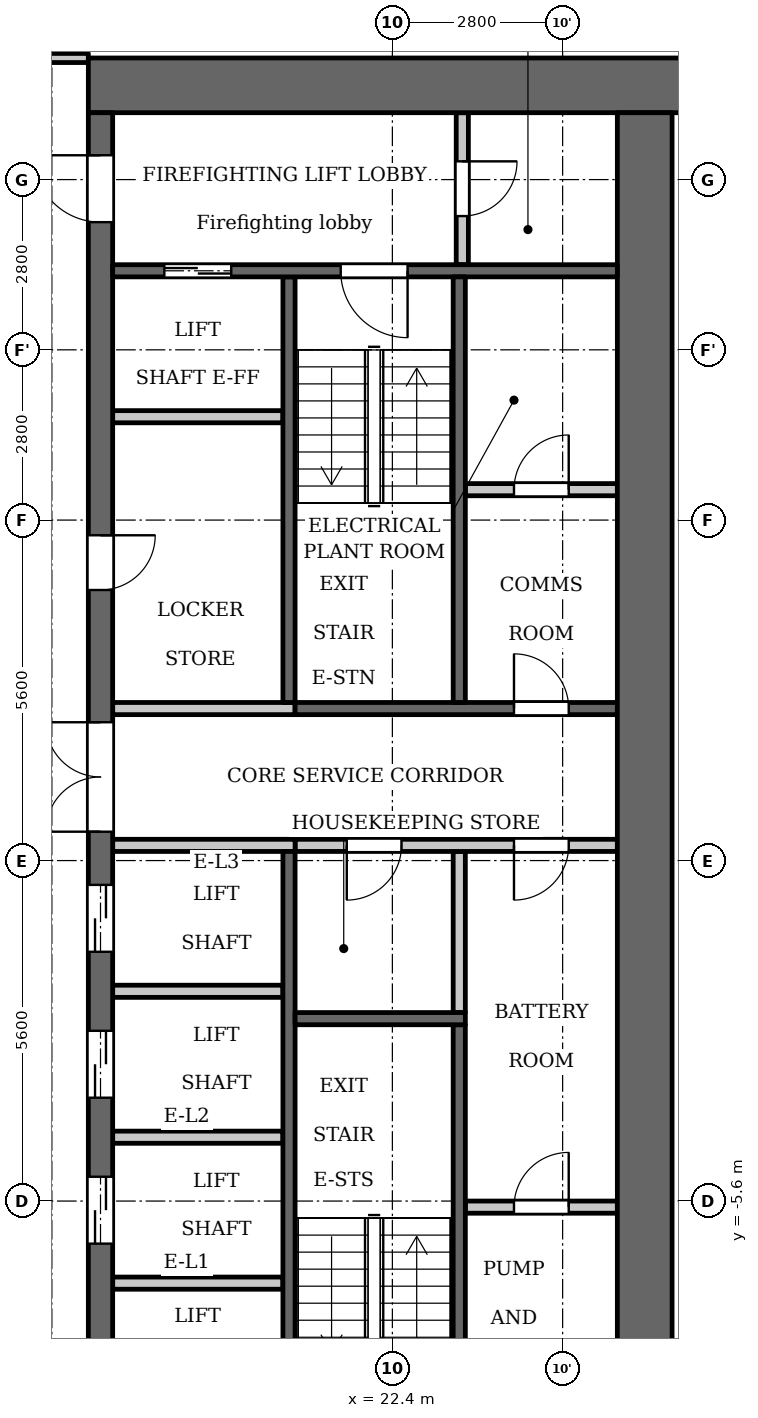
"""IFC4 building model, lengths in metres.
Left out: names, types, materials, properties, quantities, classifications, styles, units other than length and angle.
Written with IfcOpenShell. Run it as: python <this file> out.ifc"""

import sys

from ifc_helpers import new_model, si_unit, direction, frame, frame_2d, origin, place, context, subcontext, project, spatial, rectangle, extrude, element, fill, save


model = new_model("IFC4")
c1 = context("Model", 3, precision=1e-05, world=origin(), true_north=direction((0.0, 1.0)))
c2 = subcontext(c1, "Body", "Model", "MODEL_VIEW")
j1 = project(units=[si_unit("LENGTHUNIT", "METRE"), si_unit("PLANEANGLEUNIT", "RADIAN")], contexts=[c1])
p1 = place(None, origin())
s1 = spatial("IfcSite", under=j1, at=p1, CompositionType="ELEMENT")
p2 = place(p1, origin())
s2 = spatial("IfcBuilding", under=s1, at=p2, CompositionType="ELEMENT")
p3 = place(p2, frame((0.0, 0.0, 58.5)))
s3 = spatial("IfcBuildingStorey", under=s2, at=p3, CompositionType="ELEMENT", Elevation=58.5)
p4 = place(p3, frame((23.5, -2.5, 0.0), z_axis=(0.0, 0.0, 1.0), x_axis=(0.0, 1.0, 0.0)))
e1 = element("IfcWall", 1, at=p4, inside=s3, PredefinedType="PARTITIONING", context=c2, shape_type="SweptSolid", body=[
    extrude(rectangle(XDim=2.65, YDim=0.2, at=frame_2d((1.325, 0.0))), origin(), (0.0, 0.0, 1.0), 3.2),
])
p5 = place(p3, frame((20.7, 2.6, 0.0), z_axis=(0.0, 0.0, 1.0), x_axis=(0.0, 1.0, 0.0)))
e2 = element("IfcWall", 2, at=p5, inside=s3, PredefinedType="SHEAR", context=c2, shape_type="SweptSolid", body=[
    extrude(rectangle(XDim=7.0, YDim=0.2, at=frame_2d((3.5, 0.0))), origin(), (0.0, 0.0, 1.0), 3.2),
])
p6 = place(p3, frame((20.7, -9.6, 0.0), z_axis=(0.0, 0.0, 1.0), x_axis=(0.0, 1.0, 0.0)))
e3 = element("IfcWall", 3, at=p6, inside=s3, PredefinedType="SHEAR", context=c2, shape_type="SweptSolid", body=[
    extrude(rectangle(XDim=9.75, YDim=0.2, at=frame_2d((4.875, 0.0))), origin(), (0.0, 0.0, 1.0), 3.2),
])
p7 = place(p3, frame((20.8, 2.5, 0.0), z_axis=(0.0, 0.0, 1.0), x_axis=(1.0, 0.0, 0.0)))
e4 = element("IfcWall", 4, at=p7, inside=s3, PredefinedType="SHEAR", context=c2, shape_type="SweptSolid", body=[
    extrude(rectangle(XDim=5.3, YDim=0.2, at=frame_2d((2.65, 0.0))), origin(), (0.0, 0.0, 1.0), 3.2),
])
p8 = place(p7, frame((3.6, 0.0, 0.0)))
e5 = element("IfcOpeningElement", 5, at=p8, cuts=e4, PredefinedType="OPENING", context=c2, shape_type="SweptSolid", body=[
    extrude(rectangle(XDim=0.9, YDim=2.1, at=frame_2d((0.45, 1.05))), frame((0.0, 0.11, 0.0), z_axis=(0.0, -1.0, 0.0), x_axis=(1.0, 0.0, 0.0)), (0.0, 0.0, 1.0), 0.22),
])
p9 = place(p3, frame((20.8, 0.25, 0.0), z_axis=(0.0, 0.0, 1.0), x_axis=(1.0, 0.0, 0.0)))
e6 = element("IfcWall", 6, at=p9, inside=s3, PredefinedType="PARTITIONING", context=c2, shape_type="SweptSolid", body=[
    extrude(rectangle(XDim=5.3, YDim=0.2, at=frame_2d((2.65, 0.0))), origin(), (0.0, 0.0, 1.0), 3.2),
])
p10 = place(p9, frame((0.85, 0.0, 0.0)))
e7 = element("IfcOpeningElement", 7, at=p10, cuts=e6, PredefinedType="OPENING", context=c2, shape_type="SweptSolid", body=[
    extrude(rectangle(XDim=0.9, YDim=2.1, at=frame_2d((0.45, 1.05))), frame((0.0, 0.11, 0.0), z_axis=(0.0, -1.0, 0.0), x_axis=(1.0, 0.0, 0.0)), (0.0, 0.0, 1.0), 0.22),
])
p11 = place(p9, frame((3.6, 0.0, 0.0)))
e8 = element("IfcOpeningElement", 8, at=p11, cuts=e6, PredefinedType="OPENING", context=c2, shape_type="SweptSolid", body=[
    extrude(rectangle(XDim=0.9, YDim=2.1, at=frame_2d((0.45, 1.05))), frame((0.0, 0.11, 0.0), z_axis=(0.0, -1.0, 0.0), x_axis=(1.0, 0.0, 0.0)), (0.0, 0.0, 1.0), 0.22),
])
p12 = place(p3, frame((17.4, 12.75, 0.0), z_axis=(0.0, 0.0, 1.0), x_axis=(1.0, 0.0, 0.0)))
e9 = element("IfcWall", 9, at=p12, inside=s3, PredefinedType="SHEAR", context=c2, shape_type="SweptSolid", body=[
    extrude(rectangle(XDim=10.4, YDim=0.9, at=frame_2d((5.2, 0.0))), origin(), (0.0, 0.0, 1.0), 3.2),
])
p13 = place(p3, frame((17.6, -12.3, 0.0), z_axis=(0.0, 0.0, 1.0), x_axis=(0.0, 1.0, 0.0)))
e10 = element("IfcWall", 10, at=p13, inside=s3, PredefinedType="SHEAR", context=c2, shape_type="SweptSolid", body=[
    extrude(rectangle(XDim=24.6, YDim=0.4, at=frame_2d((12.3, 0.0))), origin(), (0.0, 0.0, 1.0), 3.2),
])
p14 = place(p13, frame((6.0, 0.0, 0.0)))
e11 = element("IfcOpeningElement", 11, at=p14, cuts=e10, PredefinedType="OPENING", context=c2, shape_type="SweptSolid", body=[
    extrude(rectangle(XDim=1.1, YDim=2.1, at=frame_2d((0.55, 1.05))), frame((0.0, 0.21, 0.0), z_axis=(0.0, -1.0, 0.0), x_axis=(1.0, 0.0, 0.0)), (0.0, 0.0, 1.0), 0.42),
])
p15 = place(p13, frame((8.4, 0.0, 0.0)))
e12 = element("IfcOpeningElement", 12, at=p15, cuts=e10, PredefinedType="OPENING", context=c2, shape_type="SweptSolid", body=[
    extrude(rectangle(XDim=1.1, YDim=2.1, at=frame_2d((0.55, 1.05))), frame((0.0, 0.21, 0.0), z_axis=(0.0, -1.0, 0.0), x_axis=(1.0, 0.0, 0.0)), (0.0, 0.0, 1.0), 0.42),
])
p16 = place(p13, frame((10.8, 0.0, 0.0)))
e13 = element("IfcOpeningElement", 13, at=p16, cuts=e10, PredefinedType="OPENING", context=c2, shape_type="SweptSolid", body=[
    extrude(rectangle(XDim=1.1, YDim=2.1, at=frame_2d((0.55, 1.05))), frame((0.0, 0.21, 0.0), z_axis=(0.0, -1.0, 0.0), x_axis=(1.0, 0.0, 0.0)), (0.0, 0.0, 1.0), 0.42),
])
p17 = place(p13, frame((16.75, 0.0, 0.0)))
e14 = element("IfcOpeningElement", 14, at=p17, cuts=e10, PredefinedType="OPENING", context=c2, shape_type="SweptSolid", body=[
    extrude(rectangle(XDim=0.9, YDim=2.1, at=frame_2d((0.45, 1.05))), frame((0.0, 0.21, 0.0), z_axis=(0.0, -1.0, 0.0), x_axis=(1.0, 0.0, 0.0)), (0.0, 0.0, 1.0), 0.42),
])
p18 = place(p13, frame((22.8, 0.0, 0.0)))
e15 = element("IfcOpeningElement", 15, at=p18, cuts=e10, PredefinedType="OPENING", context=c2, shape_type="SweptSolid", body=[
    extrude(rectangle(XDim=1.1, YDim=2.1, at=frame_2d((0.55, 1.05))), frame((0.0, 0.21, 0.0), z_axis=(0.0, -1.0, 0.0), x_axis=(1.0, 0.0, 0.0)), (0.0, 0.0, 1.0), 0.42),
])
p19 = place(p13, frame((0.7, 0.0, 0.0)))
e16 = element("IfcOpeningElement", 16, at=p19, cuts=e10, PredefinedType="OPENING", context=c2, shape_type="SweptSolid", body=[
    extrude(rectangle(XDim=1.1, YDim=2.1, at=frame_2d((0.55, 1.05))), frame((0.0, 0.21, 0.0), z_axis=(0.0, -1.0, 0.0), x_axis=(1.0, 0.0, 0.0)), (0.0, 0.0, 1.0), 0.42),
])
p20 = place(p13, frame((12.775, 0.0, 0.0)))
e17 = element("IfcOpeningElement", 17, at=p20, cuts=e10, PredefinedType="OPENING", context=c2, shape_type="SweptSolid", body=[
    extrude(rectangle(XDim=1.8, YDim=2.1, at=frame_2d((0.9, 1.05))), frame((0.0, 0.21, 0.0), z_axis=(0.0, -1.0, 0.0), x_axis=(1.0, 0.0, 0.0)), (0.0, 0.0, 1.0), 0.42),
])
p21 = place(p3, frame((26.55, -12.3, 0.0), z_axis=(0.0, 0.0, 1.0), x_axis=(0.0, 1.0, 0.0)))
e18 = element("IfcWall", 18, at=p21, inside=s3, PredefinedType="SHEAR", context=c2, shape_type="SweptSolid", body=[
    extrude(rectangle(XDim=24.6, YDim=0.9, at=frame_2d((12.3, 0.0))), origin(), (0.0, 0.0, 1.0), 3.2),
])
p22 = place(p3, frame((23.55, 9.8, 0.0), z_axis=(0.0, 0.0, 1.0), x_axis=(0.0, 1.0, 0.0)))
e19 = element("IfcWall", 19, at=p22, inside=s3, PredefinedType="PARTITIONING", context=c2, shape_type="SweptSolid", body=[
    extrude(rectangle(XDim=2.5, YDim=0.2, at=frame_2d((1.25, 0.0))), origin(), (0.0, 0.0, 1.0), 3.2),
])
p23 = place(p22, frame((0.8, 0.0, 0.0)))
e20 = element("IfcOpeningElement", 20, at=p23, cuts=e19, PredefinedType="OPENING", context=c2, shape_type="SweptSolid", body=[
    extrude(rectangle(XDim=0.9, YDim=2.1, at=frame_2d((0.45, 1.05))), frame((0.0, 0.11, 0.0), z_axis=(0.0, -1.0, 0.0), x_axis=(1.0, 0.0, 0.0)), (0.0, 0.0, 1.0), 0.22),
])
p24 = place(p3, frame((23.6, -5.7, 0.0), z_axis=(0.0, 0.0, 1.0), x_axis=(1.0, 0.0, 0.0)))
e21 = element("IfcWall", 21, at=p24, inside=s3, PredefinedType="PARTITIONING", context=c2, shape_type="SweptSolid", body=[
    extrude(rectangle(XDim=2.5, YDim=0.2, at=frame_2d((1.25, 0.0))), origin(), (0.0, 0.0, 1.0), 3.2),
])
p25 = place(p24, frame((0.8, 0.0, 0.0)))
e22 = element("IfcOpeningElement", 22, at=p25, cuts=e21, PredefinedType="OPENING", context=c2, shape_type="SweptSolid", body=[
    extrude(rectangle(XDim=0.9, YDim=2.1, at=frame_2d((0.45, 1.05))), frame((0.0, 0.11, 0.0), z_axis=(0.0, -1.0, 0.0), x_axis=(1.0, 0.0, 0.0)), (0.0, 0.0, 1.0), 0.22),
])
p26 = place(p3, frame((23.6, 6.1, 0.0), z_axis=(0.0, 0.0, 1.0), x_axis=(1.0, 0.0, 0.0)))
e23 = element("IfcWall", 23, at=p26, inside=s3, PredefinedType="PARTITIONING", context=c2, shape_type="SweptSolid", body=[
    extrude(rectangle(XDim=2.5, YDim=0.2, at=frame_2d((1.25, 0.0))), origin(), (0.0, 0.0, 1.0), 3.2),
])
p27 = place(p26, frame((0.8, 0.0, 0.0)))
e24 = element("IfcOpeningElement", 24, at=p27, cuts=e23, PredefinedType="OPENING", context=c2, shape_type="SweptSolid", body=[
    extrude(rectangle(XDim=0.9, YDim=2.1, at=frame_2d((0.45, 1.05))), frame((0.0, 0.11, 0.0), z_axis=(0.0, -1.0, 0.0), x_axis=(1.0, 0.0, 0.0)), (0.0, 0.0, 1.0), 0.22),
])
for number, where, z_axis, x_axis in (
    (25, (17.8, -6.95, 0.0), (0.0, 0.0, 1.0), (1.0, 0.0, 0.0)),
    (26, (17.8, -4.55, 0.0), (0.0, 0.0, 1.0), (1.0, 0.0, 0.0)),
    (27, (17.8, -2.15, 0.0), (0.0, 0.0, 1.0), (1.0, 0.0, 0.0)),
):
    element("IfcWall", number, at=place(p3, frame(where, z_axis=z_axis, x_axis=x_axis)), inside=s3, PredefinedType="PARTITIONING", context=c2, shape_type="SweptSolid", body=[
        extrude(rectangle(XDim=2.8, YDim=0.2, at=frame_2d((1.4, 0.0))), origin(), (0.0, 0.0, 1.0), 3.2),
    ])
for number, where, z_axis, x_axis in (
    (28, (17.8, 0.25, 0.0), (0.0, 0.0, 1.0), (1.0, 0.0, 0.0)),
    (29, (17.8, 2.5, 0.0), (0.0, 0.0, 1.0), (1.0, 0.0, 0.0)),
):
    element("IfcWall", number, at=place(p3, frame(where, z_axis=z_axis, x_axis=x_axis)), inside=s3, PredefinedType="PARTITIONING", context=c2, shape_type="SweptSolid", body=[
        extrude(rectangle(XDim=3.0, YDim=0.2, at=frame_2d((1.5, 0.0))), origin(), (0.0, 0.0, 1.0), 3.2),
    ])
p28 = place(p3, frame((17.8, 7.3, 0.0), z_axis=(0.0, 0.0, 1.0), x_axis=(1.0, 0.0, 0.0)))
e30 = element("IfcWall", 30, at=p28, inside=s3, PredefinedType="PARTITIONING", context=c2, shape_type="SweptSolid", body=[
    extrude(rectangle(XDim=2.8, YDim=0.2, at=frame_2d((1.4, 0.0))), origin(), (0.0, 0.0, 1.0), 3.2),
])
p29 = place(p3, frame((17.8, 9.7, 0.0), z_axis=(0.0, 0.0, 1.0), x_axis=(1.0, 0.0, 0.0)))
e31 = element("IfcWall", 31, at=p29, inside=s3, PredefinedType="SHEAR", context=c2, shape_type="SweptSolid", body=[
    extrude(rectangle(XDim=8.3, YDim=0.2, at=frame_2d((4.15, 0.0))), origin(), (0.0, 0.0, 1.0), 3.2),
])
p30 = place(p29, frame((0.85, 0.0, 0.0)))
e32 = element("IfcOpeningElement", 32, at=p30, cuts=e31, PredefinedType="OPENING", context=c2, shape_type="SweptSolid", body=[
    extrude(rectangle(XDim=1.1, YDim=2.1, at=frame_2d((0.55, 1.05))), frame((0.0, 0.11, 0.0), z_axis=(0.0, -1.0, 0.0), x_axis=(1.0, 0.0, 0.0)), (0.0, 0.0, 1.0), 0.22),
])
p31 = place(p29, frame((3.75, 0.0, 0.0)))
e33 = element("IfcOpeningElement", 33, at=p31, cuts=e31, PredefinedType="OPENING", context=c2, shape_type="SweptSolid", body=[
    extrude(rectangle(XDim=1.1, YDim=2.1, at=frame_2d((0.55, 1.05))), frame((0.0, 0.11, 0.0), z_axis=(0.0, -1.0, 0.0), x_axis=(1.0, 0.0, 0.0)), (0.0, 0.0, 1.0), 0.22),
])
p32 = place(p3, frame((23.5, 2.6, 0.0), z_axis=(0.0, 0.0, 1.0), x_axis=(0.0, 1.0, 0.0)))
e34 = element("IfcWall", 34, at=p32, inside=s3, PredefinedType="SHEAR", context=c2, shape_type="SweptSolid", body=[
    extrude(rectangle(XDim=7.0, YDim=0.2, at=frame_2d((3.5, 0.0))), origin(), (0.0, 0.0, 1.0), 3.2),
])
p33 = place(p3, frame((23.5, -9.6, 0.0), z_axis=(0.0, 0.0, 1.0), x_axis=(0.0, 1.0, 0.0)))
e35 = element("IfcWall", 35, at=p33, inside=s3, PredefinedType="SHEAR", context=c2, shape_type="SweptSolid", body=[
    extrude(rectangle(XDim=6.9, YDim=0.2, at=frame_2d((3.45, 0.0))), origin(), (0.0, 0.0, 1.0), 3.2),
])
p34 = place(p3, frame((20.8, -2.6, 0.0), z_axis=(0.0, 0.0, 1.0), x_axis=(1.0, 0.0, 0.0)))
e36 = element("IfcWall", 36, at=p34, inside=s3, PredefinedType="SHEAR", context=c2, shape_type="SweptSolid", body=[
    extrude(rectangle(XDim=2.8, YDim=0.2, at=frame_2d((1.4, 0.0))), origin(), (0.0, 0.0, 1.0), 3.2),
])
p35 = place(p3, frame((-17.4, 13.2, 0.0), z_axis=(0.0, 0.0, 1.0), x_axis=(1.0, 0.0, 0.0)))
e37 = element("IfcWall", 37, at=p35, inside=s3, PredefinedType="PARTITIONING", context=c2, shape_type="SweptSolid", body=[
    extrude(rectangle(XDim=34.8, YDim=0.15, at=frame_2d((17.4, 0.0))), origin(), (0.0, 0.0, 1.0), 3.2),
])
p36 = place(p35, frame((0.75, 0.0, 0.0)))
e38 = element("IfcOpeningElement", 38, at=p36, cuts=e37, PredefinedType="OPENING", context=c2, shape_type="SweptSolid", body=[
    extrude(rectangle(XDim=1.0, YDim=2.1, at=frame_2d((0.5, 1.05))), frame((0.0, 0.085, 0.0), z_axis=(0.0, -1.0, 0.0), x_axis=(1.0, 0.0, 0.0)), (0.0, 0.0, 1.0), 0.17),
])
p37 = place(p35, frame((33.15, 0.0, 0.0)))
e39 = element("IfcOpeningElement", 39, at=p37, cuts=e37, PredefinedType="OPENING", context=c2, shape_type="SweptSolid", body=[
    extrude(rectangle(XDim=1.0, YDim=2.1, at=frame_2d((0.5, 1.05))), frame((0.0, 0.085, 0.0), z_axis=(0.0, -1.0, 0.0), x_axis=(1.0, 0.0, 0.0)), (0.0, 0.0, 1.0), 0.17),
])
p38 = place(p35, frame((6.85, 0.0, 0.0)))
e40 = element("IfcOpeningElement", 40, at=p38, cuts=e37, PredefinedType="OPENING", context=c2, shape_type="SweptSolid", body=[
    extrude(rectangle(XDim=1.0, YDim=2.1, at=frame_2d((0.5, 1.05))), frame((0.0, 0.085, 0.0), z_axis=(0.0, -1.0, 0.0), x_axis=(1.0, 0.0, 0.0)), (0.0, 0.0, 1.0), 0.17),
])
p39 = place(p35, frame((18.05, 0.0, 0.0)))
e41 = element("IfcOpeningElement", 41, at=p39, cuts=e37, PredefinedType="OPENING", context=c2, shape_type="SweptSolid", body=[
    extrude(rectangle(XDim=1.0, YDim=2.1, at=frame_2d((0.5, 1.05))), frame((0.0, 0.085, 0.0), z_axis=(0.0, -1.0, 0.0), x_axis=(1.0, 0.0, 0.0)), (0.0, 0.0, 1.0), 0.17),
])
p40 = place(p35, frame((29.25, 0.0, 0.0)))
e42 = element("IfcOpeningElement", 42, at=p40, cuts=e37, PredefinedType="OPENING", context=c2, shape_type="SweptSolid", body=[
    extrude(rectangle(XDim=1.0, YDim=2.1, at=frame_2d((0.5, 1.05))), frame((0.0, 0.085, 0.0), z_axis=(0.0, -1.0, 0.0), x_axis=(1.0, 0.0, 0.0)), (0.0, 0.0, 1.0), 0.17),
])
p41 = place(p14, origin())
e43 = element("IfcDoor", 43, at=p41, inside=s3, OperationType="DOUBLE_DOOR_SLIDING", PredefinedType="DOOR", context=c2, shape_type="SweptSolid", body=[
    extrude(rectangle(XDim=1.1, YDim=2.1, at=frame_2d((0.55, 1.05))), frame((0.0, 0.025, 0.0), z_axis=(0.0, -1.0, 0.0), x_axis=(1.0, 0.0, 0.0)), (0.0, 0.0, 1.0), 0.05),
])
fill(e11, e43)
p42 = place(p15, origin())
e44 = element("IfcDoor", 44, at=p42, inside=s3, OperationType="DOUBLE_DOOR_SLIDING", PredefinedType="DOOR", context=c2, shape_type="SweptSolid", body=[
    extrude(rectangle(XDim=1.1, YDim=2.1, at=frame_2d((0.55, 1.05))), frame((0.0, 0.025, 0.0), z_axis=(0.0, -1.0, 0.0), x_axis=(1.0, 0.0, 0.0)), (0.0, 0.0, 1.0), 0.05),
])
fill(e12, e44)
p43 = place(p16, origin())
e45 = element("IfcDoor", 45, at=p43, inside=s3, OperationType="DOUBLE_DOOR_SLIDING", PredefinedType="DOOR", context=c2, shape_type="SweptSolid", body=[
    extrude(rectangle(XDim=1.1, YDim=2.1, at=frame_2d((0.55, 1.05))), frame((0.0, 0.025, 0.0), z_axis=(0.0, -1.0, 0.0), x_axis=(1.0, 0.0, 0.0)), (0.0, 0.0, 1.0), 0.05),
])
fill(e13, e45)
p44 = place(p17, origin())
e46 = element("IfcDoor", 46, at=p44, inside=s3, OperationType="SINGLE_SWING_RIGHT", PredefinedType="DOOR", context=c2, shape_type="SweptSolid", body=[
    extrude(rectangle(XDim=0.9, YDim=2.1, at=frame_2d((0.45, 1.05))), frame((0.0, 0.025, 0.0), z_axis=(0.0, -1.0, 0.0), x_axis=(1.0, 0.0, 0.0)), (0.0, 0.0, 1.0), 0.05),
])
fill(e14, e46)
p45 = place(p30, origin())
e47 = element("IfcDoor", 47, at=p45, inside=s3, OperationType="DOUBLE_DOOR_SLIDING", PredefinedType="DOOR", context=c2, shape_type="SweptSolid", body=[
    extrude(rectangle(XDim=1.1, YDim=2.1, at=frame_2d((0.55, 1.05))), frame((0.0, 0.025, 0.0), z_axis=(0.0, -1.0, 0.0), x_axis=(1.0, 0.0, 0.0)), (0.0, 0.0, 1.0), 0.05),
])
fill(e32, e47)
p46 = place(p18, origin())
e48 = element("IfcDoor", 48, at=p46, inside=s3, OperationType="SINGLE_SWING_LEFT", PredefinedType="DOOR", context=c2, shape_type="SweptSolid", body=[
    extrude(rectangle(XDim=1.1, YDim=2.1, at=frame_2d((0.55, 1.05))), frame((0.0, 0.025, 0.0), z_axis=(0.0, -1.0, 0.0), x_axis=(1.0, 0.0, 0.0)), (0.0, 0.0, 1.0), 0.05),
])
fill(e15, e48)
p47 = place(p23, origin())
e49 = element("IfcDoor", 49, at=p47, inside=s3, OperationType="SINGLE_SWING_RIGHT", PredefinedType="DOOR", context=c2, shape_type="SweptSolid", body=[
    extrude(rectangle(XDim=0.9, YDim=2.1, at=frame_2d((0.45, 1.05))), frame((0.0, 0.025, 0.0), z_axis=(0.0, -1.0, 0.0), x_axis=(1.0, 0.0, 0.0)), (0.0, 0.0, 1.0), 0.05),
])
fill(e20, e49)
p48 = place(p31, origin())
e50 = element("IfcDoor", 50, at=p48, inside=s3, OperationType="SINGLE_SWING_RIGHT", PredefinedType="DOOR", context=c2, shape_type="SweptSolid", body=[
    extrude(rectangle(XDim=1.1, YDim=2.1, at=frame_2d((0.55, 1.05))), frame((0.0, 0.025, 0.0), z_axis=(0.0, -1.0, 0.0), x_axis=(1.0, 0.0, 0.0)), (0.0, 0.0, 1.0), 0.05),
])
fill(e33, e50)
p49 = place(p20, origin())
e51 = element("IfcDoor", 51, at=p49, inside=s3, OperationType="DOUBLE_DOOR_SINGLE_SWING", PredefinedType="DOOR", context=c2, shape_type="SweptSolid", body=[
    extrude(rectangle(XDim=1.8, YDim=2.1, at=frame_2d((0.9, 1.05))), frame((0.0, 0.025, 0.0), z_axis=(0.0, -1.0, 0.0), x_axis=(1.0, 0.0, 0.0)), (0.0, 0.0, 1.0), 0.05),
])
fill(e17, e51)
p50 = place(p10, origin())
e52 = element("IfcDoor", 52, at=p50, inside=s3, OperationType="SINGLE_SWING_LEFT", PredefinedType="DOOR", context=c2, shape_type="SweptSolid", body=[
    extrude(rectangle(XDim=0.9, YDim=2.1, at=frame_2d((0.45, 1.05))), frame((0.0, 0.025, 0.0), z_axis=(0.0, -1.0, 0.0), x_axis=(1.0, 0.0, 0.0)), (0.0, 0.0, 1.0), 0.05),
])
fill(e7, e52)
p51 = place(p25, origin())
e53 = element("IfcDoor", 53, at=p51, inside=s3, OperationType="SINGLE_SWING_LEFT", PredefinedType="DOOR", context=c2, shape_type="SweptSolid", body=[
    extrude(rectangle(XDim=0.9, YDim=2.1, at=frame_2d((0.45, 1.05))), frame((0.0, 0.025, 0.0), z_axis=(0.0, -1.0, 0.0), x_axis=(1.0, 0.0, 0.0)), (0.0, 0.0, 1.0), 0.05),
])
fill(e22, e53)
p52 = place(p11, origin())
e54 = element("IfcDoor", 54, at=p52, inside=s3, OperationType="SINGLE_SWING_LEFT", PredefinedType="DOOR", context=c2, shape_type="SweptSolid", body=[
    extrude(rectangle(XDim=0.9, YDim=2.1, at=frame_2d((0.45, 1.05))), frame((0.0, 0.025, 0.0), z_axis=(0.0, -1.0, 0.0), x_axis=(1.0, 0.0, 0.0)), (0.0, 0.0, 1.0), 0.05),
])
fill(e8, e54)
p53 = place(p27, origin())
e55 = element("IfcDoor", 55, at=p53, inside=s3, OperationType="SINGLE_SWING_LEFT", PredefinedType="DOOR", context=c2, shape_type="SweptSolid", body=[
    extrude(rectangle(XDim=0.9, YDim=2.1, at=frame_2d((0.45, 1.05))), frame((0.0, 0.025, 0.0), z_axis=(0.0, -1.0, 0.0), x_axis=(1.0, 0.0, 0.0)), (0.0, 0.0, 1.0), 0.05),
])
fill(e24, e55)
p54 = place(p8, origin())
e56 = element("IfcDoor", 56, at=p54, inside=s3, OperationType="SINGLE_SWING_RIGHT", PredefinedType="DOOR", context=c2, shape_type="SweptSolid", body=[
    extrude(rectangle(XDim=0.9, YDim=2.1, at=frame_2d((0.45, 1.05))), frame((0.0, 0.025, 0.0), z_axis=(0.0, -1.0, 0.0), x_axis=(1.0, 0.0, 0.0)), (0.0, 0.0, 1.0), 0.05),
])
fill(e5, e56)
save(model, sys.argv[1])
